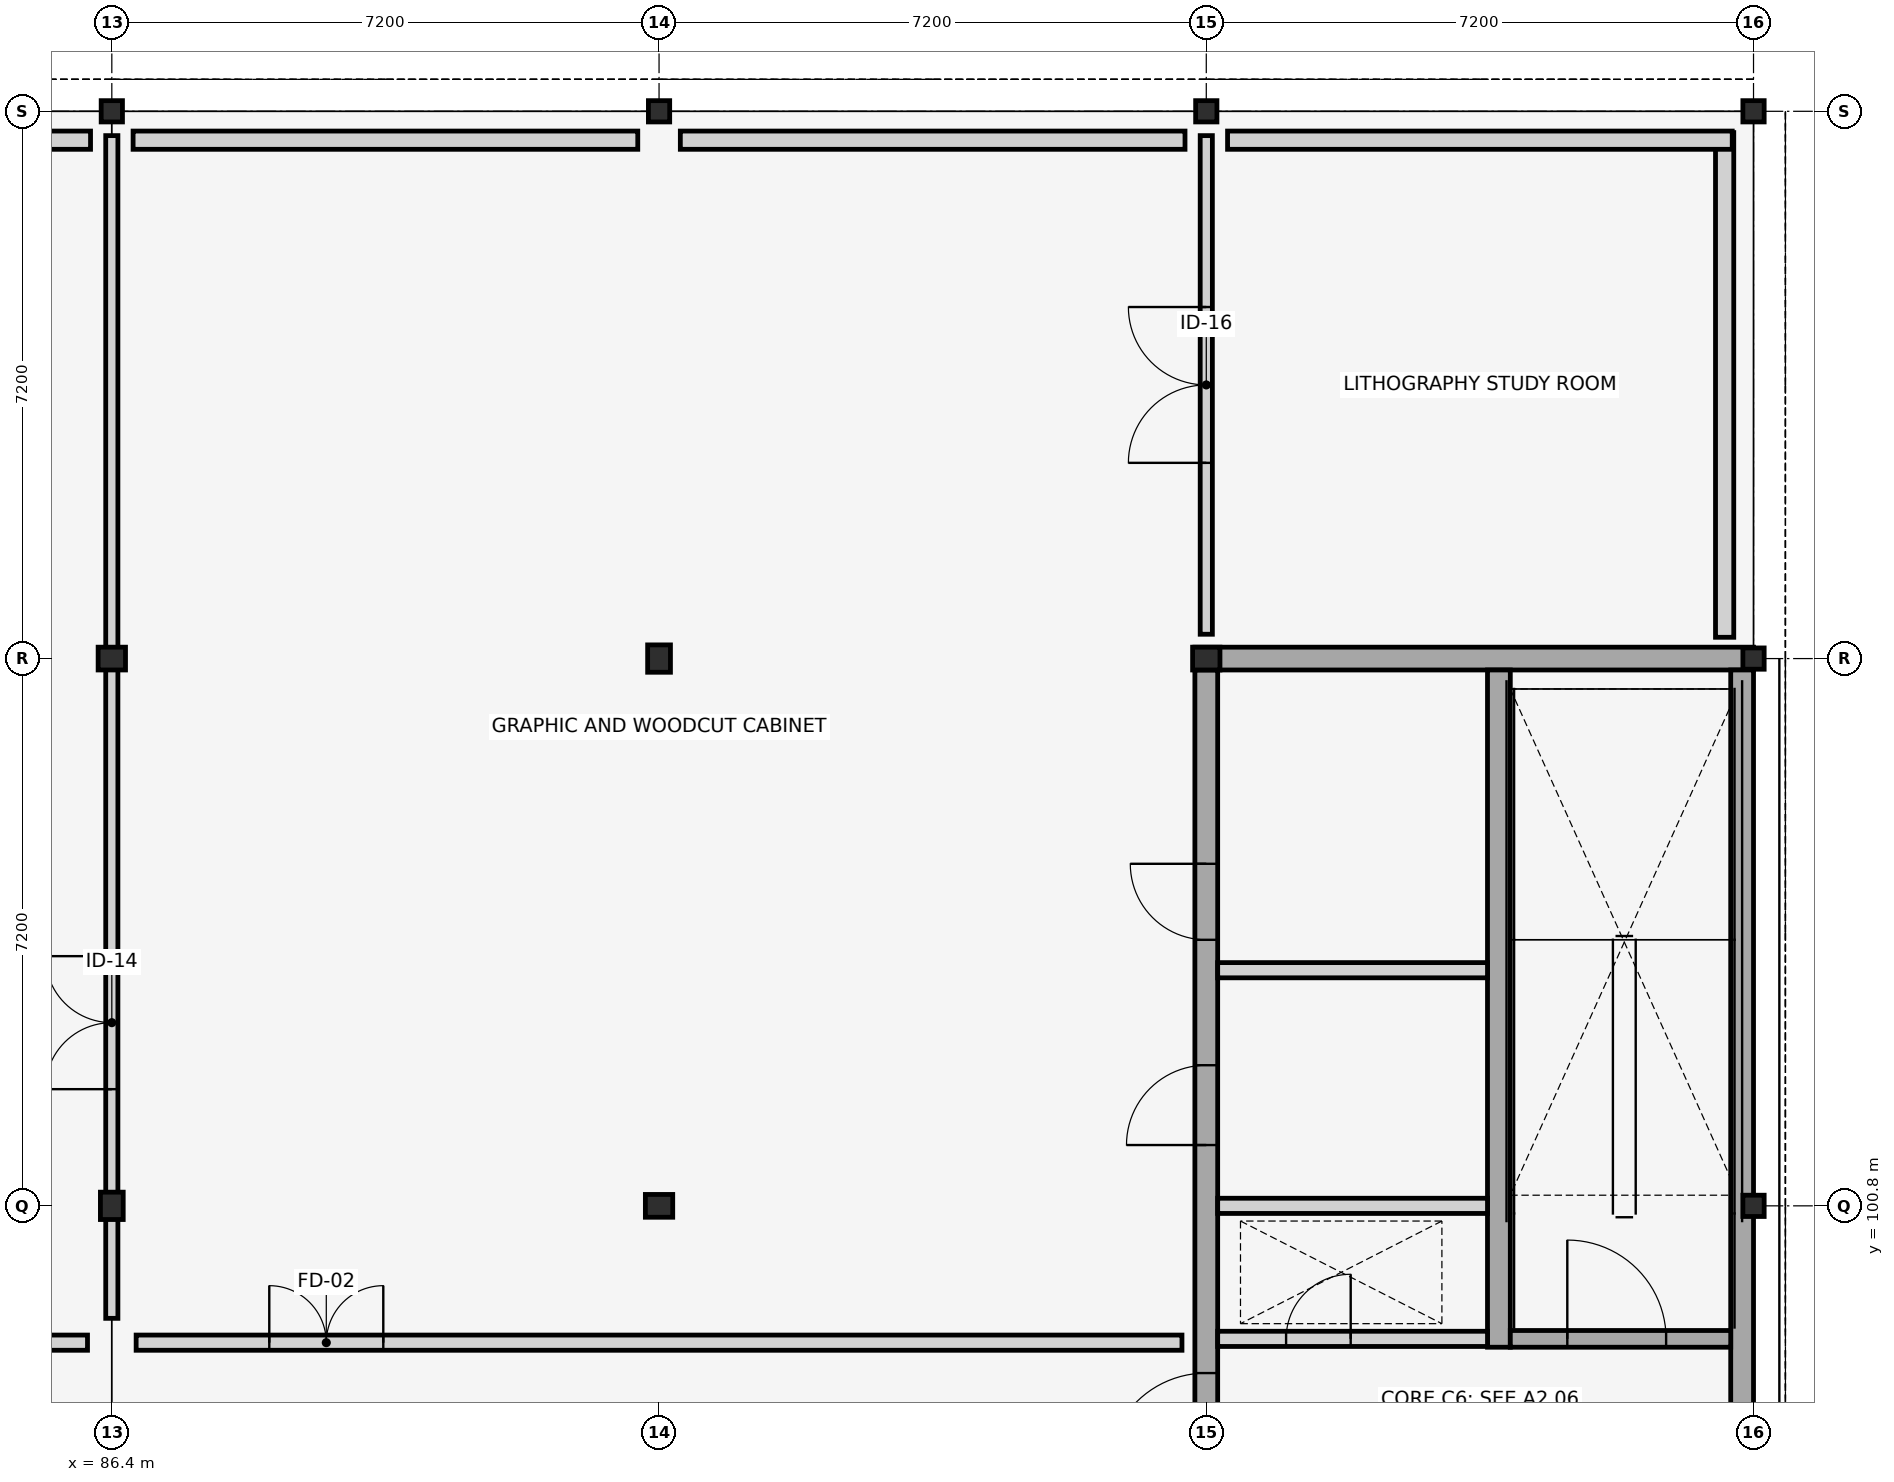
"""IFC4 building model, lengths in metres.
Left out: names, types, materials, properties, quantities, classifications, styles, units other than length and angle.
Written with IfcOpenShell. Run it as: python <this file> out.ifc"""

import sys

from ifc_helpers import new_model, si_unit, direction, frame, frame_2d, origin, origin_2d, place, context, subcontext, project, spatial, rectangle, i_section, extrude, element, fill, save


model = new_model("IFC4")
c1 = context("Model", 3, precision=1e-05, world=origin(), true_north=direction((0.0, 1.0)))
c2 = subcontext(c1, "Body", "Model", "MODEL_VIEW")
j1 = project(units=[si_unit("LENGTHUNIT", "METRE"), si_unit("PLANEANGLEUNIT", "RADIAN")], contexts=[c1])
p1 = place(None, origin())
s1 = spatial("IfcSite", under=j1, at=p1, CompositionType="ELEMENT")
p2 = place(p1, origin())
s2 = spatial("IfcBuilding", under=s1, at=p2, CompositionType="ELEMENT")
p3 = place(p2, frame((0.0, 0.0, 12.9)))
s3 = spatial("IfcBuildingStorey", under=s2, at=p3, CompositionType="ELEMENT", Elevation=12.9)
for number, where, z_axis, x_axis in (
    (1, (86.4, 100.8, 0.0), (0.0, 0.0, 1.0), (1.0, 0.0, 0.0)),
    (2, (86.4, 108.0, 0.0), (0.0, 0.0, 1.0), (0.0, 1.0, 0.0)),
):
    element("IfcColumn", number, at=place(p3, frame(where, z_axis=z_axis, x_axis=x_axis)), inside=s3, PredefinedType="COLUMN", context=c2, shape_type="SweptSolid", body=[
        extrude(i_section(OverallWidth=0.3, OverallDepth=0.36, WebThickness=0.012, FlangeThickness=0.022, FilletRadius=0.027, at=origin_2d()), origin(), (0.0, 0.0, 1.0), 4.2),
    ])
p4 = place(p3, frame((86.4, 115.2, 0.0), z_axis=(0.0, 0.0, 1.0), x_axis=(1.0, 0.0, 0.0)))
e3 = element("IfcColumn", 3, at=p4, inside=s3, PredefinedType="COLUMN", context=c2, shape_type="SweptSolid", body=[
    extrude(i_section(OverallWidth=0.28, OverallDepth=0.28, WebThickness=0.01, FlangeThickness=0.018, FilletRadius=0.024, at=origin_2d()), origin(), (0.0, 0.0, 1.0), 4.2),
])
for number, where, z_axis, x_axis in (
    (4, (93.6, 100.8, 0.0), (0.0, 0.0, 1.0), (0.0, 1.0, 0.0)),
    (5, (93.6, 108.0, 0.0), (0.0, 0.0, 1.0), (1.0, 0.0, 0.0)),
):
    element("IfcColumn", number, at=place(p3, frame(where, z_axis=z_axis, x_axis=x_axis)), inside=s3, PredefinedType="COLUMN", context=c2, shape_type="SweptSolid", body=[
        extrude(i_section(OverallWidth=0.3, OverallDepth=0.36, WebThickness=0.012, FlangeThickness=0.022, FilletRadius=0.027, at=origin_2d()), origin(), (0.0, 0.0, 1.0), 4.2),
    ])
p5 = place(p3, frame((93.6, 115.2, 0.0), z_axis=(0.0, 0.0, 1.0), x_axis=(0.0, 1.0, 0.0)))
e6 = element("IfcColumn", 6, at=p5, inside=s3, PredefinedType="COLUMN", context=c2, shape_type="SweptSolid", body=[
    extrude(i_section(OverallWidth=0.28, OverallDepth=0.28, WebThickness=0.01, FlangeThickness=0.018, FilletRadius=0.024, at=origin_2d()), origin(), (0.0, 0.0, 1.0), 4.2),
])
p6 = place(p3, frame((100.8, 108.0, 0.0), z_axis=(0.0, 0.0, 1.0), x_axis=(0.0, 1.0, 0.0)))
e7 = element("IfcColumn", 7, at=p6, inside=s3, PredefinedType="COLUMN", context=c2, shape_type="SweptSolid", body=[
    extrude(i_section(OverallWidth=0.3, OverallDepth=0.36, WebThickness=0.012, FlangeThickness=0.022, FilletRadius=0.027, at=origin_2d()), origin(), (0.0, 0.0, 1.0), 4.2),
])
for number, where, z_axis, x_axis in (
    (8, (100.8, 115.2, 0.0), (0.0, 0.0, 1.0), (1.0, 0.0, 0.0)),
    (9, (108.0, 100.8, 0.0), (0.0, 0.0, 1.0), (0.0, 1.0, 0.0)),
    (10, (108.0, 108.0, 0.0), (0.0, 0.0, 1.0), (1.0, 0.0, 0.0)),
    (11, (108.0, 115.2, 0.0), (0.0, 0.0, 1.0), (0.0, 1.0, 0.0)),
):
    element("IfcColumn", number, at=place(p3, frame(where, z_axis=z_axis, x_axis=x_axis)), inside=s3, PredefinedType="COLUMN", context=c2, shape_type="SweptSolid", body=[
        extrude(i_section(OverallWidth=0.28, OverallDepth=0.28, WebThickness=0.01, FlangeThickness=0.018, FilletRadius=0.024, at=origin_2d()), origin(), (0.0, 0.0, 1.0), 4.2),
    ])
for number, where, z_axis, x_axis in (
    (12, (107.62, 108.28, 0.0), (0.0, 0.0, 1.0), (0.0, 1.0, 0.0)),
    (13, (107.72, 114.82, 0.0), (0.0, 0.0, 1.0), (-1.0, 0.0, 0.0)),
):
    element("IfcWall", number, at=place(p3, frame(where, z_axis=z_axis, x_axis=x_axis)), inside=s3, PredefinedType="STANDARD", context=c2, shape_type="SweptSolid", body=[
        extrude(rectangle(XDim=6.64, YDim=0.24, at=frame_2d((3.32, 0.0))), origin(), (0.0, 0.0, 1.0), 3.56),
    ])
for number, where, z_axis, x_axis in (
    (14, (100.52, 114.82, 0.0), (0.0, 0.0, 1.0), (-1.0, 0.0, 0.0)),
    (15, (93.32, 114.82, 0.0), (0.0, 0.0, 1.0), (-1.0, 0.0, 0.0)),
    (16, (86.12, 114.82, 0.0), (0.0, 0.0, 1.0), (-1.0, 0.0, 0.0)),
):
    element("IfcWall", number, at=place(p3, frame(where, z_axis=z_axis, x_axis=x_axis)), inside=s3, PredefinedType="STANDARD", context=c2, shape_type="SweptSolid", body=[
        extrude(rectangle(XDim=6.64, YDim=0.24, at=frame_2d((3.32, 0.0))), origin(), (0.0, 0.0, 1.0), 3.56),
    ])
p7 = place(p3, frame((100.65, 108.0, 0.0), z_axis=(0.0, 0.0, 1.0), x_axis=(1.0, 0.0, 0.0)))
e17 = element("IfcWall", 17, at=p7, inside=s3, PredefinedType="SHEAR", context=c2, shape_type="SweptSolid", body=[
    extrude(rectangle(XDim=7.35, YDim=0.3, at=frame_2d((3.675, 0.0))), origin(), (0.0, 0.0, 1.0), 3.96),
])
p8 = place(p3, frame((107.85, 93.75, 0.0), z_axis=(0.0, 0.0, 1.0), x_axis=(0.0, 1.0, 0.0)))
e18 = element("IfcWall", 18, at=p8, inside=s3, PredefinedType="SHEAR", context=c2, shape_type="SweptSolid", body=[
    extrude(rectangle(XDim=14.1, YDim=0.3, at=frame_2d((7.05, 0.0))), origin(), (0.0, 0.0, 1.0), 3.96),
])
p9 = place(p3, frame((100.8, 93.75, 0.0), z_axis=(0.0, 0.0, 1.0), x_axis=(0.0, 1.0, 0.0)))
e19 = element("IfcWall", 19, at=p9, inside=s3, PredefinedType="SHEAR", context=c2, shape_type="SweptSolid", body=[
    extrude(rectangle(XDim=14.1, YDim=0.3, at=frame_2d((7.05, 0.0))), origin(), (0.0, 0.0, 1.0), 3.96),
])
p10 = place(p9, frame((3.55, 0.0, 0.0)))
e20 = element("IfcOpeningElement", 20, at=p10, cuts=e19, PredefinedType="OPENING", context=c2, shape_type="SweptSolid", body=[
    extrude(rectangle(XDim=1.3, YDim=2.2, at=frame_2d((0.65, 1.1))), frame((0.0, 0.16, 0.0), z_axis=(0.0, -1.0, 0.0), x_axis=(1.0, 0.0, 0.0)), (0.0, 0.0, 1.0), 0.32),
])
p11 = place(p9, frame((7.85, 0.0, 0.0)))
e21 = element("IfcOpeningElement", 21, at=p11, cuts=e19, PredefinedType="OPENING", context=c2, shape_type="SweptSolid", body=[
    extrude(rectangle(XDim=1.05, YDim=2.15, at=frame_2d((0.525, 1.075))), frame((0.0, 0.16, 0.0), z_axis=(0.0, -1.0, 0.0), x_axis=(1.0, 0.0, 0.0)), (0.0, 0.0, 1.0), 0.32),
])
p12 = place(p9, frame((10.55, 0.0, 0.0)))
e22 = element("IfcOpeningElement", 22, at=p12, cuts=e19, PredefinedType="OPENING", context=c2, shape_type="SweptSolid", body=[
    extrude(rectangle(XDim=1.0, YDim=2.15, at=frame_2d((0.5, 1.075))), frame((0.0, 0.16, 0.0), z_axis=(0.0, -1.0, 0.0), x_axis=(1.0, 0.0, 0.0)), (0.0, 0.0, 1.0), 0.32),
])
p13 = place(p3, frame((104.65, 98.94, 0.0), z_axis=(0.0, 0.0, 1.0), x_axis=(0.0, 1.0, 0.0)))
e23 = element("IfcWall", 23, at=p13, inside=s3, PredefinedType="SHEAR", context=c2, shape_type="SweptSolid", body=[
    extrude(rectangle(XDim=8.91, YDim=0.3, at=frame_2d((4.455, 0.0))), origin(), (0.0, 0.0, 1.0), 3.96),
])
p14 = place(p3, frame((100.95, 99.05, 0.0), z_axis=(0.0, 0.0, 1.0), x_axis=(1.0, 0.0, 0.0)))
e24 = element("IfcWall", 24, at=p14, inside=s3, PredefinedType="PLUMBINGWALL", context=c2, shape_type="SweptSolid", body=[
    extrude(rectangle(XDim=3.55, YDim=0.2, at=frame_2d((1.775, 0.0))), origin(), (0.0, 0.0, 1.0), 3.38),
])
p15 = place(p14, frame((0.9, 0.0, 0.0)))
e25 = element("IfcOpeningElement", 25, at=p15, cuts=e24, PredefinedType="OPENING", context=c2, shape_type="SweptSolid", body=[
    extrude(rectangle(XDim=0.85, YDim=2.05, at=frame_2d((0.425, 1.025))), frame((0.0, 0.11, 0.0), z_axis=(0.0, -1.0, 0.0), x_axis=(1.0, 0.0, 0.0)), (0.0, 0.0, 1.0), 0.22),
])
p16 = place(p3, frame((104.8, 99.05, 0.0), z_axis=(0.0, 0.0, 1.0), x_axis=(1.0, 0.0, 0.0)))
e26 = element("IfcWall", 26, at=p16, inside=s3, PredefinedType="SHEAR", context=c2, shape_type="SweptSolid", body=[
    extrude(rectangle(XDim=2.9, YDim=0.22, at=frame_2d((1.45, 0.0))), origin(), (0.0, 0.0, 1.0), 3.96),
])
p17 = place(p16, frame((0.75, 0.0, 0.0)))
e27 = element("IfcOpeningElement", 27, at=p17, cuts=e26, PredefinedType="OPENING", context=c2, shape_type="SweptSolid", body=[
    extrude(rectangle(XDim=1.3, YDim=2.2, at=frame_2d((0.65, 1.1))), frame((0.0, 0.12, 0.0), z_axis=(0.0, -1.0, 0.0), x_axis=(1.0, 0.0, 0.0)), (0.0, 0.0, 1.0), 0.24),
])
for number, where, z_axis, x_axis in (
    (28, (100.95, 100.8, 0.0), (0.0, 0.0, 1.0), (1.0, 0.0, 0.0)),
    (29, (100.95, 103.9, 0.0), (0.0, 0.0, 1.0), (1.0, 0.0, 0.0)),
):
    element("IfcWall", number, at=place(p3, frame(where, z_axis=z_axis, x_axis=x_axis)), inside=s3, PredefinedType="PLUMBINGWALL", context=c2, shape_type="SweptSolid", body=[
        extrude(rectangle(XDim=3.55, YDim=0.2, at=frame_2d((1.775, 0.0))), origin(), (0.0, 0.0, 1.0), 3.38),
    ])
p18 = place(p3, frame((65.12, 99.0, 0.0), z_axis=(0.0, 0.0, 1.0), x_axis=(1.0, 0.0, 0.0)))
e30 = element("IfcWall", 30, at=p18, inside=s3, PredefinedType="PARTITIONING", context=c2, shape_type="SweptSolid", body=[
    extrude(rectangle(XDim=20.96, YDim=0.2, at=frame_2d((10.48, 0.0))), origin(), (0.0, 0.0, 1.0), 3.15),
])
p19 = place(p18, frame((9.68, 0.0, 0.0)))
e31 = element("IfcOpeningElement", 31, at=p19, cuts=e30, PredefinedType="OPENING", context=c2, shape_type="SweptSolid", body=[
    extrude(rectangle(XDim=1.6, YDim=2.35, at=frame_2d((0.8, 1.175))), frame((0.0, 0.11, 0.0), z_axis=(0.0, -1.0, 0.0), x_axis=(1.0, 0.0, 0.0)), (0.0, 0.0, 1.0), 0.22),
])
p20 = place(p3, frame((86.72, 99.0, 0.0), z_axis=(0.0, 0.0, 1.0), x_axis=(1.0, 0.0, 0.0)))
e32 = element("IfcWall", 32, at=p20, inside=s3, PredefinedType="PARTITIONING", context=c2, shape_type="SweptSolid", body=[
    extrude(rectangle(XDim=13.76, YDim=0.2, at=frame_2d((6.88, 0.0))), origin(), (0.0, 0.0, 1.0), 3.15),
])
p21 = place(p20, frame((1.752, 0.0, 0.0)))
e33 = element("IfcOpeningElement", 33, at=p21, cuts=e32, PredefinedType="OPENING", context=c2, shape_type="SweptSolid", body=[
    extrude(rectangle(XDim=1.5, YDim=2.25, at=frame_2d((0.75, 1.125))), frame((0.0, 0.11, 0.0), z_axis=(0.0, -1.0, 0.0), x_axis=(1.0, 0.0, 0.0)), (0.0, 0.0, 1.0), 0.22),
])
p22 = place(p3, frame((86.4, 99.32, 0.0), z_axis=(0.0, 0.0, 1.0), x_axis=(0.0, 1.0, 0.0)))
e34 = element("IfcWall", 34, at=p22, inside=s3, PredefinedType="PARTITIONING", context=c2, shape_type="SweptSolid", body=[
    extrude(rectangle(XDim=15.56, YDim=0.16, at=frame_2d((7.78, 0.0))), origin(), (0.0, 0.0, 1.0), 3.15),
])
p23 = place(p22, frame((3.015, 0.0, 0.0)))
e35 = element("IfcOpeningElement", 35, at=p23, cuts=e34, PredefinedType="OPENING", context=c2, shape_type="SweptSolid", body=[
    extrude(rectangle(XDim=1.75, YDim=2.45, at=frame_2d((0.875, 1.225))), frame((0.0, 0.09, 0.0), z_axis=(0.0, -1.0, 0.0), x_axis=(1.0, 0.0, 0.0)), (0.0, 0.0, 1.0), 0.18),
])
p24 = place(p3, frame((100.8, 108.32, 0.0), z_axis=(0.0, 0.0, 1.0), x_axis=(0.0, 1.0, 0.0)))
e36 = element("IfcWall", 36, at=p24, inside=s3, PredefinedType="PARTITIONING", context=c2, shape_type="SweptSolid", body=[
    extrude(rectangle(XDim=6.56, YDim=0.16, at=frame_2d((3.28, 0.0))), origin(), (0.0, 0.0, 1.0), 3.15),
])
p25 = place(p24, frame((2.255, 0.0, 0.0)))
e37 = element("IfcOpeningElement", 37, at=p25, cuts=e36, PredefinedType="OPENING", context=c2, shape_type="SweptSolid", body=[
    extrude(rectangle(XDim=2.05, YDim=2.55, at=frame_2d((1.025, 1.275))), frame((0.0, 0.09, 0.0), z_axis=(0.0, -1.0, 0.0), x_axis=(1.0, 0.0, 0.0)), (0.0, 0.0, 1.0), 0.18),
])
p26 = place(p10, origin())
e38 = element("IfcDoor", 38, at=p26, inside=s3, OperationType="SINGLE_SWING_LEFT", PredefinedType="DOOR", context=c2, shape_type="SweptSolid", body=[
    extrude(rectangle(XDim=1.3, YDim=2.2, at=frame_2d((0.65, 1.1))), frame((0.0, 0.025, 0.0), z_axis=(0.0, -1.0, 0.0), x_axis=(1.0, 0.0, 0.0)), (0.0, 0.0, 1.0), 0.05),
])
fill(e20, e38)
p27 = place(p11, origin())
e39 = element("IfcDoor", 39, at=p27, inside=s3, OperationType="SINGLE_SWING_LEFT", PredefinedType="DOOR", context=c2, shape_type="SweptSolid", body=[
    extrude(rectangle(XDim=1.05, YDim=2.15, at=frame_2d((0.525, 1.075))), frame((0.0, 0.025, 0.0), z_axis=(0.0, -1.0, 0.0), x_axis=(1.0, 0.0, 0.0)), (0.0, 0.0, 1.0), 0.05),
])
fill(e21, e39)
p28 = place(p12, origin())
e40 = element("IfcDoor", 40, at=p28, inside=s3, OperationType="SINGLE_SWING_RIGHT", PredefinedType="DOOR", context=c2, shape_type="SweptSolid", body=[
    extrude(rectangle(XDim=1.0, YDim=2.15, at=frame_2d((0.5, 1.075))), frame((0.0, 0.025, 0.0), z_axis=(0.0, -1.0, 0.0), x_axis=(1.0, 0.0, 0.0)), (0.0, 0.0, 1.0), 0.05),
])
fill(e22, e40)
p29 = place(p15, origin())
e41 = element("IfcDoor", 41, at=p29, inside=s3, OperationType="SINGLE_SWING_RIGHT", PredefinedType="TRAPDOOR", context=c2, shape_type="SweptSolid", body=[
    extrude(rectangle(XDim=0.85, YDim=2.05, at=frame_2d((0.425, 1.025))), frame((0.0, 0.025, 0.0), z_axis=(0.0, -1.0, 0.0), x_axis=(1.0, 0.0, 0.0)), (0.0, 0.0, 1.0), 0.05),
])
fill(e25, e41)
p30 = place(p17, origin())
e42 = element("IfcDoor", 42, at=p30, inside=s3, OperationType="SINGLE_SWING_LEFT", PredefinedType="DOOR", context=c2, shape_type="SweptSolid", body=[
    extrude(rectangle(XDim=1.3, YDim=2.2, at=frame_2d((0.65, 1.1))), frame((0.0, 0.025, 0.0), z_axis=(0.0, -1.0, 0.0), x_axis=(1.0, 0.0, 0.0)), (0.0, 0.0, 1.0), 0.05),
])
fill(e27, e42)
p31 = place(p21, origin())
e43 = element("IfcDoor", 43, at=p31, inside=s3, OperationType="DOUBLE_DOOR_SINGLE_SWING", PredefinedType="DOOR", context=c2, shape_type="SweptSolid", body=[
    extrude(rectangle(XDim=1.5, YDim=2.25, at=frame_2d((0.75, 1.125))), frame((0.0, 0.025, 0.0), z_axis=(0.0, -1.0, 0.0), x_axis=(1.0, 0.0, 0.0)), (0.0, 0.0, 1.0), 0.05),
])
fill(e33, e43)
p32 = place(p23, origin())
e44 = element("IfcDoor", 44, at=p32, inside=s3, OperationType="DOUBLE_DOOR_SINGLE_SWING", PredefinedType="DOOR", context=c2, shape_type="SweptSolid", body=[
    extrude(rectangle(XDim=1.75, YDim=2.45, at=frame_2d((0.875, 1.225))), frame((0.0, 0.025, 0.0), z_axis=(0.0, -1.0, 0.0), x_axis=(1.0, 0.0, 0.0)), (0.0, 0.0, 1.0), 0.05),
])
fill(e35, e44)
p33 = place(p25, origin())
e45 = element("IfcDoor", 45, at=p33, inside=s3, OperationType="DOUBLE_DOOR_SINGLE_SWING", PredefinedType="DOOR", context=c2, shape_type="SweptSolid", body=[
    extrude(rectangle(XDim=2.05, YDim=2.55, at=frame_2d((1.025, 1.275))), frame((0.0, 0.025, 0.0), z_axis=(0.0, -1.0, 0.0), x_axis=(1.0, 0.0, 0.0)), (0.0, 0.0, 1.0), 0.05),
])
fill(e37, e45)
save(model, sys.argv[1])
